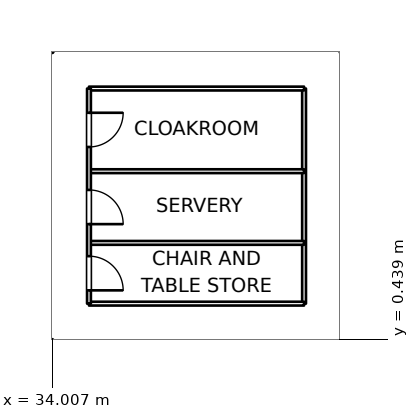
"""IFC4 building model, lengths in metres.
Left out: names, types, materials, properties, quantities, classifications, styles, units other than length and angle.
Written with IfcOpenShell. Run it as: python <this file> out.ifc"""

import sys

from ifc_helpers import new_model, si_unit, direction, frame, frame_2d, origin, place, context, subcontext, project, spatial, rectangle, extrude, element, fill, save


model = new_model("IFC4")
c1 = context("Model", 3, precision=1e-05, world=origin(), true_north=direction((0.0, 1.0)))
c2 = subcontext(c1, "Body", "Model", "MODEL_VIEW")
j1 = project(units=[si_unit("LENGTHUNIT", "METRE"), si_unit("PLANEANGLEUNIT", "RADIAN")], contexts=[c1])
p1 = place(None, origin())
s1 = spatial("IfcSite", under=j1, at=p1, CompositionType="ELEMENT")
p2 = place(p1, origin())
s2 = spatial("IfcBuilding", under=s1, at=p2, CompositionType="ELEMENT")
p3 = place(p2, frame((0.0, 0.0, 16.0)))
s3 = spatial("IfcBuildingStorey", under=s2, at=p3, CompositionType="ELEMENT", Elevation=16.0)
for number, where, z_axis, x_axis in (
    (1, (34.97, 1.37, 0.0), (0.0, 0.0, 1.0), (1.0, 0.0, 0.0)),
    (2, (40.63, 1.37, 0.0), (0.0, 0.0, 1.0), (0.0, 1.0, 0.0)),
    (3, (40.63, 7.03, 0.0), (0.0, 0.0, 1.0), (-1.0, 0.0, 0.0)),
):
    element("IfcWall", number, at=place(p3, frame(where, z_axis=z_axis, x_axis=x_axis)), inside=s3, PredefinedType="PARTITIONING", context=c2, shape_type="SweptSolid", body=[
        extrude(rectangle(XDim=5.66, YDim=0.1, at=frame_2d((2.83, 0.0))), origin(), (0.0, 0.0, 1.0), 4.7),
    ])
p4 = place(p3, frame((34.97, 7.03, 0.0), z_axis=(0.0, 0.0, 1.0), x_axis=(0.0, -1.0, 0.0)))
e4 = element("IfcWall", 4, at=p4, inside=s3, PredefinedType="PARTITIONING", context=c2, shape_type="SweptSolid", body=[
    extrude(rectangle(XDim=5.66, YDim=0.1, at=frame_2d((2.83, 0.0))), origin(), (0.0, 0.0, 1.0), 4.7),
])
p5 = place(p4, frame((4.411, 0.0, 0.0)))
e5 = element("IfcOpeningElement", 5, at=p5, cuts=e4, PredefinedType="OPENING", context=c2, shape_type="SweptSolid", body=[
    extrude(rectangle(XDim=0.9, YDim=2.1, at=frame_2d((0.45, 1.05))), frame((0.0, 0.06, 0.0), z_axis=(0.0, -1.0, 0.0), x_axis=(1.0, 0.0, 0.0)), (0.0, 0.0, 1.0), 0.12),
])
p6 = place(p4, frame((2.668, 0.0, 0.0)))
e6 = element("IfcOpeningElement", 6, at=p6, cuts=e4, PredefinedType="OPENING", context=c2, shape_type="SweptSolid", body=[
    extrude(rectangle(XDim=0.9, YDim=2.1, at=frame_2d((0.45, 1.05))), frame((0.0, 0.06, 0.0), z_axis=(0.0, -1.0, 0.0), x_axis=(1.0, 0.0, 0.0)), (0.0, 0.0, 1.0), 0.12),
])
p7 = place(p4, frame((0.637, 0.0, 0.0)))
e7 = element("IfcOpeningElement", 7, at=p7, cuts=e4, PredefinedType="OPENING", context=c2, shape_type="SweptSolid", body=[
    extrude(rectangle(XDim=0.9, YDim=2.1, at=frame_2d((0.45, 1.05))), frame((0.0, 0.06, 0.0), z_axis=(0.0, -1.0, 0.0), x_axis=(1.0, 0.0, 0.0)), (0.0, 0.0, 1.0), 0.12),
])
for number, where, z_axis, x_axis in (
    (8, (34.97, 2.969, 0.0), (0.0, 0.0, 1.0), (1.0, 0.0, 0.0)),
    (9, (34.97, 4.855, 0.0), (0.0, 0.0, 1.0), (1.0, 0.0, 0.0)),
):
    element("IfcWall", number, at=place(p3, frame(where, z_axis=z_axis, x_axis=x_axis)), inside=s3, PredefinedType="PARTITIONING", context=c2, shape_type="SweptSolid", body=[
        extrude(rectangle(XDim=5.66, YDim=0.1, at=frame_2d((2.83, 0.0))), origin(), (0.0, 0.0, 1.0), 4.7),
    ])
p8 = place(p3, frame((9.45, 6.495, 0.0), z_axis=(0.0, 0.0, 1.0), x_axis=(0.866025301493, -0.500000177174, 0.0)))
e10 = element("IfcWall", 10, at=p8, inside=s3, PredefinedType="SOLIDWALL", context=c2, shape_type="SweptSolid", body=[
    extrude(rectangle(XDim=43.095, YDim=0.3, at=frame_2d((21.548, 0.0))), origin(), (0.0, 0.0, 1.0), 4.7),
])
p9 = place(p8, frame((26.595, 0.0, 0.0)))
e11 = element("IfcOpeningElement", 11, at=p9, cuts=e10, PredefinedType="OPENING", context=c2, shape_type="SweptSolid", body=[
    extrude(rectangle(XDim=1.8, YDim=2.4, at=frame_2d((0.9, 1.2))), frame((0.0, 0.16, 0.0), z_axis=(0.0, -1.0, 0.0), x_axis=(1.0, 0.0, 0.0)), (0.0, 0.0, 1.0), 0.32),
])
p10 = place(p5, origin())
e12 = element("IfcDoor", 12, at=p10, inside=s3, OperationType="SINGLE_SWING_RIGHT", PredefinedType="DOOR", context=c2, shape_type="SweptSolid", body=[
    extrude(rectangle(XDim=0.9, YDim=2.1, at=frame_2d((0.45, 1.05))), frame((0.0, 0.025, 0.0), z_axis=(0.0, -1.0, 0.0), x_axis=(1.0, 0.0, 0.0)), (0.0, 0.0, 1.0), 0.05),
])
fill(e5, e12)
p11 = place(p6, origin())
e13 = element("IfcDoor", 13, at=p11, inside=s3, OperationType="SINGLE_SWING_RIGHT", PredefinedType="DOOR", context=c2, shape_type="SweptSolid", body=[
    extrude(rectangle(XDim=0.9, YDim=2.1, at=frame_2d((0.45, 1.05))), frame((0.0, 0.025, 0.0), z_axis=(0.0, -1.0, 0.0), x_axis=(1.0, 0.0, 0.0)), (0.0, 0.0, 1.0), 0.05),
])
fill(e6, e13)
p12 = place(p7, origin())
e14 = element("IfcDoor", 14, at=p12, inside=s3, OperationType="SINGLE_SWING_LEFT", PredefinedType="DOOR", context=c2, shape_type="SweptSolid", body=[
    extrude(rectangle(XDim=0.9, YDim=2.1, at=frame_2d((0.45, 1.05))), frame((0.0, 0.025, 0.0), z_axis=(0.0, -1.0, 0.0), x_axis=(1.0, 0.0, 0.0)), (0.0, 0.0, 1.0), 0.05),
])
fill(e7, e14)
save(model, sys.argv[1])
